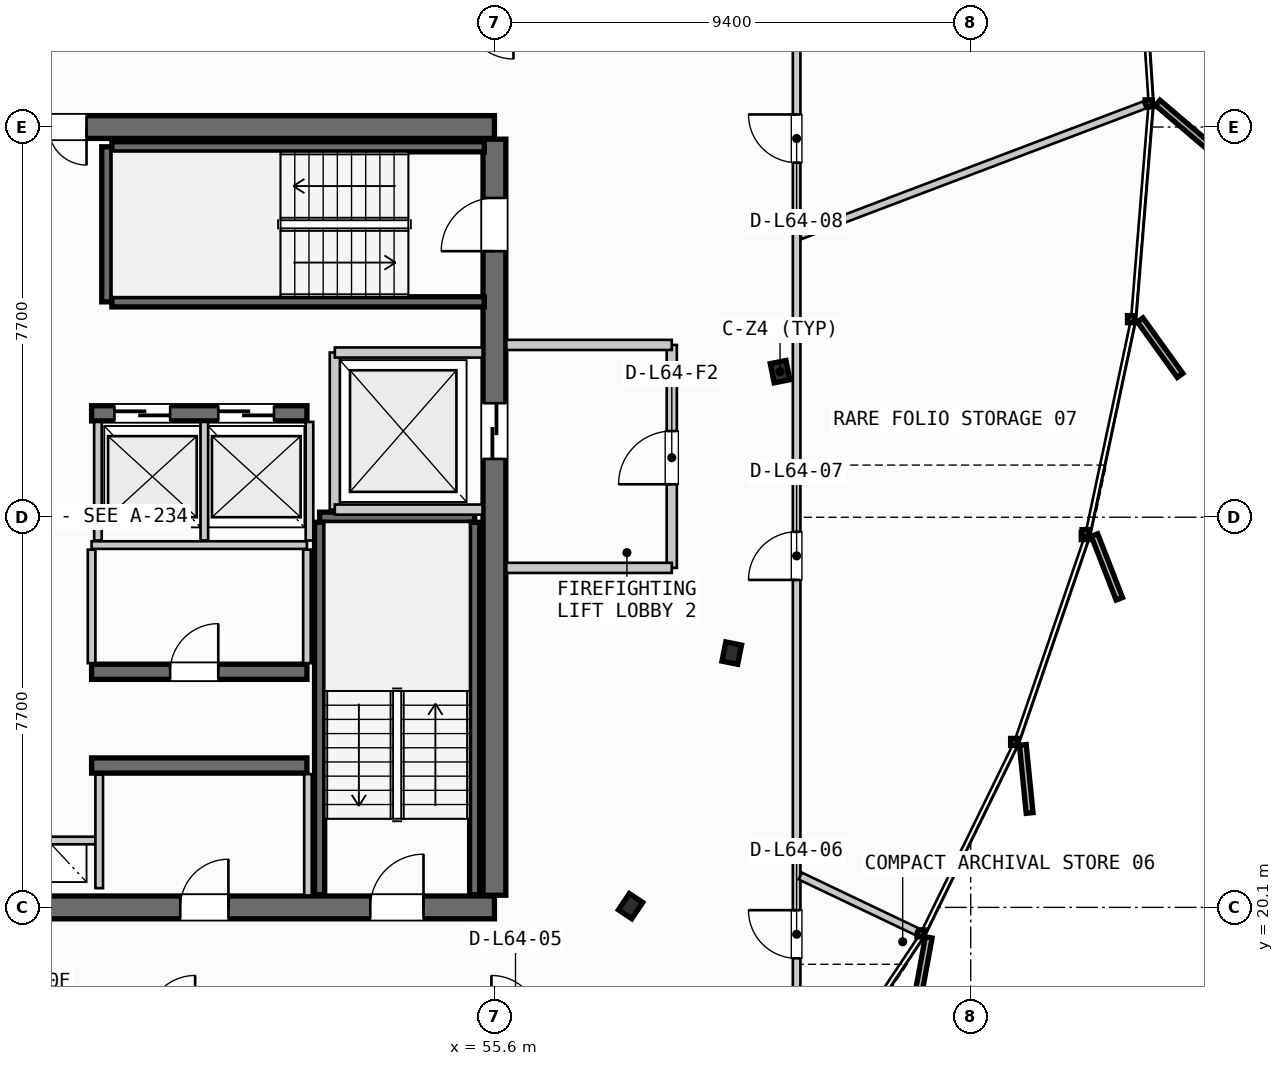
"""IFC4 building model, lengths in metres.
Left out: names, types, materials, properties, quantities, classifications, styles, units other than length and angle.
Written with IfcOpenShell. Run it as: python <this file> out.ifc"""

import sys

from ifc_helpers import new_model, si_unit, direction, frame, frame_2d, origin, origin_2d, place, context, subcontext, project, spatial, rectangle, i_section, extrude, source, transform, mapped, element, fill, save


model = new_model("IFC4")
c1 = context("Model", 3, precision=1e-05, world=origin(), true_north=direction((0.0, 1.0)))
c2 = subcontext(c1, "Body", "Model", "MODEL_VIEW")
j1 = project(units=[si_unit("LENGTHUNIT", "METRE"), si_unit("PLANEANGLEUNIT", "RADIAN")], contexts=[c1])
p1 = place(None, origin())
s1 = spatial("IfcSite", under=j1, at=p1, CompositionType="ELEMENT")
p2 = place(p1, origin())
s2 = spatial("IfcBuilding", under=s1, at=p2, CompositionType="ELEMENT")
p3 = place(p2, frame((0.0, 0.0, 245.65)))
s3 = spatial("IfcBuildingStorey", under=s2, at=p3, CompositionType="ELEMENT", Elevation=245.65)
p4 = place(p3, frame((38.0, 20.1, 0.0), z_axis=(0.0, 0.0, 1.0), x_axis=(1.0, 0.0, 0.0)))
e1 = element("IfcWall", 1, at=p4, inside=s3, PredefinedType="SHEAR", context=c2, shape_type="SweptSolid", body=[
    extrude(rectangle(XDim=17.6, YDim=0.45, at=frame_2d((8.8, 0.0))), origin(), (0.0, 0.0, 1.0), 3.21),
])
p5 = place(p4, frame((1.4, 0.0, 0.0)))
e2 = element("IfcOpeningElement", 2, at=p5, cuts=e1, PredefinedType="OPENING", context=c2, shape_type="SweptSolid", body=[
    extrude(rectangle(XDim=1.05, YDim=2.15, at=frame_2d((0.525, 1.075))), frame((0.0, 0.235, 0.0), z_axis=(0.0, -1.0, 0.0), x_axis=(1.0, 0.0, 0.0)), (0.0, 0.0, 1.0), 0.47),
])
p6 = place(p4, frame((15.15, 0.0, 0.0)))
e3 = element("IfcOpeningElement", 3, at=p6, cuts=e1, PredefinedType="OPENING", context=c2, shape_type="SweptSolid", body=[
    extrude(rectangle(XDim=1.05, YDim=2.15, at=frame_2d((0.525, 1.075))), frame((0.0, 0.235, 0.0), z_axis=(0.0, -1.0, 0.0), x_axis=(1.0, 0.0, 0.0)), (0.0, 0.0, 1.0), 0.47),
])
p7 = place(p4, frame((5.25, 0.0, 0.0)))
e4 = element("IfcOpeningElement", 4, at=p7, cuts=e1, PredefinedType="OPENING", context=c2, shape_type="SweptSolid", body=[
    extrude(rectangle(XDim=0.95, YDim=2.15, at=frame_2d((0.475, 1.075))), frame((0.0, 0.235, 0.0), z_axis=(0.0, -1.0, 0.0), x_axis=(1.0, 0.0, 0.0)), (0.0, 0.0, 1.0), 0.47),
])
p8 = place(p4, frame((11.4, 0.0, 0.0)))
e5 = element("IfcOpeningElement", 5, at=p8, cuts=e1, PredefinedType="OPENING", context=c2, shape_type="SweptSolid", body=[
    extrude(rectangle(XDim=0.95, YDim=2.15, at=frame_2d((0.475, 1.075))), frame((0.0, 0.235, 0.0), z_axis=(0.0, -1.0, 0.0), x_axis=(1.0, 0.0, 0.0)), (0.0, 0.0, 1.0), 0.47),
])
p9 = place(p3, frame((55.6, 35.5, 0.0), z_axis=(0.0, 0.0, 1.0), x_axis=(-1.0, 0.0, 0.0)))
e6 = element("IfcWall", 6, at=p9, inside=s3, PredefinedType="SHEAR", context=c2, shape_type="SweptSolid", body=[
    extrude(rectangle(XDim=17.6, YDim=0.45, at=frame_2d((8.8, 0.0))), origin(), (0.0, 0.0, 1.0), 3.21),
])
p10 = place(p9, frame((8.05, 0.0, 0.0)))
e7 = element("IfcOpeningElement", 7, at=p10, cuts=e6, PredefinedType="OPENING", context=c2, shape_type="SweptSolid", body=[
    extrude(rectangle(XDim=1.5, YDim=2.2, at=frame_2d((0.75, 1.1))), frame((0.0, 0.235, 0.0), z_axis=(0.0, -1.0, 0.0), x_axis=(1.0, 0.0, 0.0)), (0.0, 0.0, 1.0), 0.47),
])
p11 = place(p9, frame((15.1, 0.0, 0.0)))
e8 = element("IfcOpeningElement", 8, at=p11, cuts=e6, PredefinedType="OPENING", context=c2, shape_type="SweptSolid", body=[
    extrude(rectangle(XDim=0.95, YDim=2.15, at=frame_2d((0.475, 1.075))), frame((0.0, 0.235, 0.0), z_axis=(0.0, -1.0, 0.0), x_axis=(1.0, 0.0, 0.0)), (0.0, 0.0, 1.0), 0.47),
])
p12 = place(p9, frame((12.6, 0.0, 0.0)))
e9 = element("IfcOpeningElement", 9, at=p12, cuts=e6, PredefinedType="OPENING", context=c2, shape_type="SweptSolid", body=[
    extrude(rectangle(XDim=0.95, YDim=2.15, at=frame_2d((0.475, 1.075))), frame((0.0, 0.235, 0.0), z_axis=(0.0, -1.0, 0.0), x_axis=(1.0, 0.0, 0.0)), (0.0, 0.0, 1.0), 0.47),
])
p13 = place(p9, frame((10.45, 0.0, 0.0)))
e10 = element("IfcOpeningElement", 10, at=p13, cuts=e6, PredefinedType="OPENING", context=c2, shape_type="SweptSolid", body=[
    extrude(rectangle(XDim=0.95, YDim=2.15, at=frame_2d((0.475, 1.075))), frame((0.0, 0.235, 0.0), z_axis=(0.0, -1.0, 0.0), x_axis=(1.0, 0.0, 0.0)), (0.0, 0.0, 1.0), 0.47),
])
p14 = place(p3, frame((55.6, 20.34, 0.0), z_axis=(0.0, 0.0, 1.0), x_axis=(0.0, 1.0, 0.0)))
e11 = element("IfcWall", 11, at=p14, inside=s3, PredefinedType="SHEAR", context=c2, shape_type="SweptSolid", body=[
    extrude(rectangle(XDim=14.92, YDim=0.45, at=frame_2d((7.46, 0.0))), origin(), (0.0, 0.0, 1.0), 3.21),
])
p15 = place(p14, frame((12.71, 0.0, 0.0)))
e12 = element("IfcOpeningElement", 12, at=p15, cuts=e11, PredefinedType="OPENING", context=c2, shape_type="SweptSolid", body=[
    extrude(rectangle(XDim=1.05, YDim=2.15, at=frame_2d((0.525, 1.075))), frame((0.0, 0.235, 0.0), z_axis=(0.0, -1.0, 0.0), x_axis=(1.0, 0.0, 0.0)), (0.0, 0.0, 1.0), 0.47),
])
p16 = place(p14, frame((8.61, 0.0, 0.0)))
e13 = element("IfcOpeningElement", 13, at=p16, cuts=e11, PredefinedType="OPENING", context=c2, shape_type="SweptSolid", body=[
    extrude(rectangle(XDim=1.1, YDim=2.2, at=frame_2d((0.55, 1.1))), frame((0.0, 0.235, 0.0), z_axis=(0.0, -1.0, 0.0), x_axis=(1.0, 0.0, 0.0)), (0.0, 0.0, 1.0), 0.47),
])
p17 = place(p3, frame((47.65, 22.9, 0.0), z_axis=(0.0, 0.0, 1.0), x_axis=(1.0, 0.0, 0.0)))
e14 = element("IfcWall", 14, at=p17, inside=s3, PredefinedType="SHEAR", context=c2, shape_type="SweptSolid", body=[
    extrude(rectangle(XDim=4.25, YDim=0.3, at=frame_2d((2.125, 0.0))), origin(), (0.0, 0.0, 1.0), 3.21),
])
p18 = place(p3, frame((47.65, 24.75, 0.0), z_axis=(0.0, 0.0, 1.0), x_axis=(1.0, 0.0, 0.0)))
e15 = element("IfcWall", 15, at=p18, inside=s3, PredefinedType="SHEAR", context=c2, shape_type="SweptSolid", body=[
    extrude(rectangle(XDim=4.25, YDim=0.3, at=frame_2d((2.125, 0.0))), origin(), (0.0, 0.0, 1.0), 3.21),
])
p19 = place(p18, frame((1.55, 0.0, 0.0)))
e16 = element("IfcOpeningElement", 16, at=p19, cuts=e15, PredefinedType="OPENING", context=c2, shape_type="SweptSolid", body=[
    extrude(rectangle(XDim=0.95, YDim=2.15, at=frame_2d((0.475, 1.075))), frame((0.0, 0.16, 0.0), z_axis=(0.0, -1.0, 0.0), x_axis=(1.0, 0.0, 0.0)), (0.0, 0.0, 1.0), 0.32),
])
p20 = place(p3, frame((47.65, 29.85, 0.0), z_axis=(0.0, 0.0, 1.0), x_axis=(1.0, 0.0, 0.0)))
e17 = element("IfcWall", 17, at=p20, inside=s3, PredefinedType="SHEAR", context=c2, shape_type="SweptSolid", body=[
    extrude(rectangle(XDim=4.25, YDim=0.3, at=frame_2d((2.125, 0.0))), origin(), (0.0, 0.0, 1.0), 3.21),
])
p21 = place(p20, frame((0.45, 0.0, 0.0)))
e18 = element("IfcOpeningElement", 18, at=p21, cuts=e17, PredefinedType="OPENING", context=c2, shape_type="SweptSolid", body=[
    extrude(rectangle(XDim=1.1, YDim=2.2, at=frame_2d((0.55, 1.1))), frame((0.0, 0.16, 0.0), z_axis=(0.0, -1.0, 0.0), x_axis=(1.0, 0.0, 0.0)), (0.0, 0.0, 1.0), 0.32),
])
p22 = place(p20, frame((2.5, 0.0, 0.0)))
e19 = element("IfcOpeningElement", 19, at=p22, cuts=e17, PredefinedType="OPENING", context=c2, shape_type="SweptSolid", body=[
    extrude(rectangle(XDim=1.1, YDim=2.2, at=frame_2d((0.55, 1.1))), frame((0.0, 0.16, 0.0), z_axis=(0.0, -1.0, 0.0), x_axis=(1.0, 0.0, 0.0)), (0.0, 0.0, 1.0), 0.32),
])
m1 = source(origin(), c2, "Body", "SweptSolid", [
    extrude(i_section(OverallWidth=0.387, OverallDepth=0.316, WebThickness=0.019, FlangeThickness=0.028, FilletRadius=0.015, at=origin_2d()), origin(), (0.0, 0.0, 1.0), 3.21),
])
for number, where, z_axis, x_axis in (
    (20, (61.237, 30.672, 0.0), (0.0, 0.0, 1.0), (0.981, 0.195, 0.0)),
    (21, (58.287, 20.125, 0.0), (0.0, 0.0, 1.0), (0.831, -0.556, 0.0)),
    (22, (60.284, 25.118, 0.0), (0.0, 0.0, 1.0), (0.981, -0.195, 0.0)),
):
    element("IfcColumn", number, at=place(p3, frame(where, z_axis=z_axis, x_axis=x_axis)), inside=s3, PredefinedType="COLUMN", context=c2, shape_type="MappedRepresentation", body=[
        mapped(m1, transform((0.0, 0.0, 0.0), scale=1.0)),
    ])
p23 = place(p3, frame((52.15, 27.8, 0.0), z_axis=(0.0, 0.0, 1.0), x_axis=(1.0, 0.0, 0.0)))
e23 = element("IfcWall", 23, at=p23, inside=s3, PredefinedType="SHEAR", context=c2, shape_type="SweptSolid", body=[
    extrude(rectangle(XDim=3.06, YDim=0.2, at=frame_2d((1.53, 0.0))), origin(), (0.0, 0.0, 1.0), 3.21),
])
for number, where, z_axis, x_axis in (
    (24, (55.21, 27.7, 0.0), (0.0, 0.0, 1.0), (0.0, -1.0, 0.0)),
    (25, (52.15, 20.35, 0.0), (0.0, 0.0, 1.0), (0.0, 1.0, 0.0)),
):
    element("IfcWall", number, at=place(p3, frame(where, z_axis=z_axis, x_axis=x_axis)), inside=s3, PredefinedType="SHEAR", context=c2, shape_type="SweptSolid", body=[
        extrude(rectangle(XDim=7.35, YDim=0.2, at=frame_2d((3.675, 0.0))), origin(), (0.0, 0.0, 1.0), 3.21),
    ])
p24 = place(p3, frame((47.95, 32.05, 0.0), z_axis=(0.0, 0.0, 1.0), x_axis=(0.0, 1.0, 0.0)))
e26 = element("IfcWall", 26, at=p24, inside=s3, PredefinedType="SHEAR", context=c2, shape_type="SweptSolid", body=[
    extrude(rectangle(XDim=3.06, YDim=0.2, at=frame_2d((1.53, 0.0))), origin(), (0.0, 0.0, 1.0), 3.21),
])
for number, where, z_axis, x_axis in (
    (27, (48.05, 35.11, 0.0), (0.0, 0.0, 1.0), (1.0, 0.0, 0.0)),
    (28, (55.4, 32.05, 0.0), (0.0, 0.0, 1.0), (-1.0, 0.0, 0.0)),
):
    element("IfcWall", number, at=place(p3, frame(where, z_axis=z_axis, x_axis=x_axis)), inside=s3, PredefinedType="SHEAR", context=c2, shape_type="SweptSolid", body=[
        extrude(rectangle(XDim=7.35, YDim=0.2, at=frame_2d((3.675, 0.0))), origin(), (0.0, 0.0, 1.0), 3.21),
    ])
p25 = place(p3, frame((45.8, 21.42, 0.0), z_axis=(0.0, 0.0, 1.0), x_axis=(1.0, 0.0, 0.0)))
e29 = element("IfcWall", 29, at=p25, inside=s3, PredefinedType="PARTITIONING", context=c2, shape_type="SweptSolid", body=[
    extrude(rectangle(XDim=2.0, YDim=0.15, at=frame_2d((1.0, 0.0))), origin(), (0.0, 0.0, 1.0), 2.28),
])
p26 = place(p3, frame((47.8, 20.48, 0.0), z_axis=(0.0, 0.0, 1.0), x_axis=(0.0, 1.0, 0.0)))
e30 = element("IfcWall", 30, at=p26, inside=s3, PredefinedType="PARTITIONING", context=c2, shape_type="SweptSolid", body=[
    extrude(rectangle(XDim=2.24, YDim=0.15, at=frame_2d((1.12, 0.0))), origin(), (0.0, 0.0, 1.0), 2.28),
])
p27 = place(p3, frame((52.45, 27.95, 0.0), z_axis=(0.0, 0.0, 1.0), x_axis=(0.0, 1.0, 0.0)))
e31 = element("IfcWall", 31, at=p27, inside=s3, PredefinedType="PARTITIONING", context=c2, shape_type="SweptSolid", body=[
    extrude(rectangle(XDim=3.1, YDim=0.2, at=frame_2d((1.55, 0.0))), origin(), (0.0, 0.0, 1.0), 2.28),
])
for number, where, z_axis, x_axis in (
    (32, (52.45, 27.95, 0.0), (0.0, 0.0, 1.0), (1.0, 0.0, 0.0)),
    (33, (52.45, 31.05, 0.0), (0.0, 0.0, 1.0), (1.0, 0.0, 0.0)),
):
    element("IfcWall", number, at=place(p3, frame(where, z_axis=z_axis, x_axis=x_axis)), inside=s3, PredefinedType="PARTITIONING", context=c2, shape_type="SweptSolid", body=[
        extrude(rectangle(XDim=2.915, YDim=0.2, at=frame_2d((1.458, 0.0))), origin(), (0.0, 0.0, 1.0), 2.28),
    ])
p28 = place(p3, frame((59.1, 26.8, 0.0), z_axis=(0.0, 0.0, 1.0), x_axis=(0.0, 1.0, 0.0)))
e34 = element("IfcWall", 34, at=p28, inside=s3, PredefinedType="PARTITIONING", context=c2, shape_type="SweptSolid", body=[
    extrude(rectangle(XDim=4.4, YDim=0.2, at=frame_2d((2.2, 0.0))), origin(), (0.0, 0.0, 1.0), 2.28),
])
p29 = place(p28, frame((1.65, 0.0, 0.0)))
e35 = element("IfcOpeningElement", 35, at=p29, cuts=e34, PredefinedType="OPENING", context=c2, shape_type="SweptSolid", body=[
    extrude(rectangle(XDim=1.05, YDim=2.15, at=frame_2d((0.525, 1.075))), frame((0.0, 0.11, 0.0), z_axis=(0.0, -1.0, 0.0), x_axis=(1.0, 0.0, 0.0)), (0.0, 0.0, 1.0), 0.22),
])
for number, where, z_axis, x_axis in (
    (36, (55.835, 26.8, 0.0), (0.0, 0.0, 1.0), (1.0, 0.0, 0.0)),
    (37, (55.835, 31.2, 0.0), (0.0, 0.0, 1.0), (1.0, 0.0, 0.0)),
):
    element("IfcWall", number, at=place(p3, frame(where, z_axis=z_axis, x_axis=x_axis)), inside=s3, PredefinedType="PARTITIONING", context=c2, shape_type="SweptSolid", body=[
        extrude(rectangle(XDim=3.265, YDim=0.2, at=frame_2d((1.633, 0.0))), origin(), (0.0, 0.0, 1.0), 2.28),
    ])
p30 = place(p3, frame((51.92, 20.335, 0.0), z_axis=(0.0, 0.0, 1.0), x_axis=(0.0, 1.0, 0.0)))
e38 = element("IfcWall", 38, at=p30, inside=s3, PredefinedType="PARTITIONING", context=c2, shape_type="SweptSolid", body=[
    extrude(rectangle(XDim=2.395, YDim=0.15, at=frame_2d((1.198, 0.0))), origin(), (0.0, 0.0, 1.0), 2.28),
])
p31 = place(p3, frame((47.65, 27.25, 0.0), z_axis=(0.0, 0.0, 1.0), x_axis=(1.0, 0.0, 0.0)))
e39 = element("IfcWall", 39, at=p31, inside=s3, PredefinedType="PARTITIONING", context=c2, shape_type="SweptSolid", body=[
    extrude(rectangle(XDim=4.25, YDim=0.15, at=frame_2d((2.125, 0.0))), origin(), (0.0, 0.0, 1.0), 2.28),
])
for number, where, z_axis, x_axis in (
    (40, (47.65, 24.92, 0.0), (0.0, 0.0, 1.0), (0.0, 1.0, 0.0)),
    (41, (51.9, 24.92, 0.0), (0.0, 0.0, 1.0), (0.0, 1.0, 0.0)),
):
    element("IfcWall", number, at=place(p3, frame(where, z_axis=z_axis, x_axis=x_axis)), inside=s3, PredefinedType="PARTITIONING", context=c2, shape_type="SweptSolid", body=[
        extrude(rectangle(XDim=2.24, YDim=0.15, at=frame_2d((1.12, 0.0))), origin(), (0.0, 0.0, 1.0), 2.28),
    ])
for number, where, z_axis, x_axis in (
    (42, (47.775, 27.34, 0.0), (0.0, 0.0, 1.0), (0.0, 1.0, 0.0)),
    (43, (49.875, 27.34, 0.0), (0.0, 0.0, 1.0), (0.0, 1.0, 0.0)),
    (44, (51.95, 27.34, 0.0), (0.0, 0.0, 1.0), (0.0, 1.0, 0.0)),
):
    element("IfcWall", number, at=place(p3, frame(where, z_axis=z_axis, x_axis=x_axis)), inside=s3, PredefinedType="PARTITIONING", context=c2, shape_type="SweptSolid", body=[
        extrude(rectangle(XDim=2.34, YDim=0.15, at=frame_2d((1.17, 0.0))), origin(), (0.0, 0.0, 1.0), 2.28),
    ])
p32 = place(p3, frame((61.564, 17.807, 0.0), z_axis=(0.0, 0.0, 1.0), x_axis=(0.0, 1.0, 0.0)))
e45 = element("IfcWall", 45, at=p32, inside=s3, PredefinedType="PARTITIONING", context=c2, shape_type="SweptSolid", body=[
    extrude(rectangle(XDim=19.986, YDim=0.15, at=frame_2d((9.993, 0.0))), origin(), (0.0, 0.0, 1.0), 2.28),
])
p33 = place(p32, frame((1.288, 0.0, 0.0)))
e46 = element("IfcOpeningElement", 46, at=p33, cuts=e45, PredefinedType="OPENING", context=c2, shape_type="SweptSolid", body=[
    extrude(rectangle(XDim=0.95, YDim=2.15, at=frame_2d((0.475, 1.075))), frame((0.0, 0.085, 0.0), z_axis=(0.0, -1.0, 0.0), x_axis=(1.0, 0.0, 0.0)), (0.0, 0.0, 1.0), 0.17),
])
p34 = place(p32, frame((8.755, 0.0, 0.0)))
e47 = element("IfcOpeningElement", 47, at=p34, cuts=e45, PredefinedType="OPENING", context=c2, shape_type="SweptSolid", body=[
    extrude(rectangle(XDim=0.95, YDim=2.15, at=frame_2d((0.475, 1.075))), frame((0.0, 0.085, 0.0), z_axis=(0.0, -1.0, 0.0), x_axis=(1.0, 0.0, 0.0)), (0.0, 0.0, 1.0), 0.17),
])
p35 = place(p32, frame((16.991, 0.0, 0.0)))
e48 = element("IfcOpeningElement", 48, at=p35, cuts=e45, PredefinedType="OPENING", context=c2, shape_type="SweptSolid", body=[
    extrude(rectangle(XDim=0.95, YDim=2.15, at=frame_2d((0.475, 1.075))), frame((0.0, 0.085, 0.0), z_axis=(0.0, -1.0, 0.0), x_axis=(1.0, 0.0, 0.0)), (0.0, 0.0, 1.0), 0.17),
])
p36 = place(p3, frame((61.636, 20.719, 0.0), z_axis=(0.0, 0.0, 1.0), x_axis=(0.902636442074, -0.430403826006, 0.0)))
e49 = element("IfcWall", 49, at=p36, inside=s3, PredefinedType="PARTITIONING", context=c2, shape_type="SweptSolid", body=[
    extrude(rectangle(XDim=2.539, YDim=0.15, at=frame_2d((1.27, 0.0))), origin(), (0.0, 0.0, 1.0), 2.28),
])
p37 = place(p3, frame((61.639, 33.361, 0.0), z_axis=(0.0, 0.0, 1.0), x_axis=(0.935050196541, 0.354515345152, 0.0)))
e50 = element("IfcWall", 50, at=p37, inside=s3, PredefinedType="PARTITIONING", context=c2, shape_type="SweptSolid", body=[
    extrude(rectangle(XDim=7.26, YDim=0.15, at=frame_2d((3.63, 0.0))), origin(), (0.0, 0.0, 1.0), 2.28),
])
m2 = source(origin(), c2, "Body", "SweptSolid", [
    extrude(rectangle(XDim=1.05, YDim=2.15, at=frame_2d((0.525, 1.075))), frame((0.0, 0.025, 0.0), z_axis=(0.0, -1.0, 0.0), x_axis=(1.0, 0.0, 0.0)), (0.0, 0.0, 1.0), 0.05),
])
p38 = place(p6, origin())
e51 = element("IfcDoor", 51, at=p38, inside=s3, OperationType="SINGLE_SWING_RIGHT", PredefinedType="DOOR", context=c2, shape_type="MappedRepresentation", body=[
    mapped(m2, transform((0.0, 0.0, 0.0), scale=1.0)),
])
fill(e3, e51)
p39 = place(p15, origin())
e52 = element("IfcDoor", 52, at=p39, inside=s3, OperationType="SINGLE_SWING_LEFT", PredefinedType="DOOR", context=c2, shape_type="MappedRepresentation", body=[
    mapped(m2, transform((0.0, 0.0, 0.0), scale=1.0)),
])
fill(e12, e52)
m3 = source(origin(), c2, "Body", "SweptSolid", [
    extrude(rectangle(XDim=1.5, YDim=2.2, at=frame_2d((0.75, 1.1))), frame((0.0, 0.025, 0.0), z_axis=(0.0, -1.0, 0.0), x_axis=(1.0, 0.0, 0.0)), (0.0, 0.0, 1.0), 0.05),
])
p40 = place(p10, origin())
e53 = element("IfcDoor", 53, at=p40, inside=s3, OperationType="DOUBLE_DOOR_SINGLE_SWING", PredefinedType="DOOR", context=c2, shape_type="MappedRepresentation", body=[
    mapped(m3, transform((0.0, 0.0, 0.0), scale=1.0)),
])
fill(e7, e53)
m4 = source(origin(), c2, "Body", "SweptSolid", [
    extrude(rectangle(XDim=1.1, YDim=2.2, at=frame_2d((0.55, 1.1))), frame((0.0, 0.025, 0.0), z_axis=(0.0, -1.0, 0.0), x_axis=(1.0, 0.0, 0.0)), (0.0, 0.0, 1.0), 0.05),
])
p41 = place(p16, origin())
e54 = element("IfcDoor", 54, at=p41, inside=s3, OperationType="SLIDING_TO_RIGHT", PredefinedType="DOOR", context=c2, shape_type="MappedRepresentation", body=[
    mapped(m4, transform((0.0, 0.0, 0.0), scale=1.0)),
])
fill(e13, e54)
m5 = source(origin(), c2, "Body", "SweptSolid", [
    extrude(rectangle(XDim=0.95, YDim=2.15, at=frame_2d((0.475, 1.075))), frame((0.0, 0.025, 0.0), z_axis=(0.0, -1.0, 0.0), x_axis=(1.0, 0.0, 0.0)), (0.0, 0.0, 1.0), 0.05),
])
p42 = place(p8, origin())
e55 = element("IfcDoor", 55, at=p42, inside=s3, OperationType="SINGLE_SWING_RIGHT", PredefinedType="DOOR", context=c2, shape_type="MappedRepresentation", body=[
    mapped(m5, transform((0.0, 0.0, 0.0), scale=1.0)),
])
fill(e5, e55)
p43 = place(p19, origin())
e56 = element("IfcDoor", 56, at=p43, inside=s3, OperationType="SINGLE_SWING_RIGHT", PredefinedType="DOOR", context=c2, shape_type="MappedRepresentation", body=[
    mapped(m5, transform((0.0, 0.0, 0.0), scale=1.0)),
])
fill(e16, e56)
p44 = place(p21, origin())
e57 = element("IfcDoor", 57, at=p44, inside=s3, OperationType="SLIDING_TO_LEFT", PredefinedType="DOOR", context=c2, shape_type="MappedRepresentation", body=[
    mapped(m4, transform((0.0, 0.0, 0.0), scale=1.0)),
])
fill(e18, e57)
p45 = place(p22, origin())
e58 = element("IfcDoor", 58, at=p45, inside=s3, OperationType="SLIDING_TO_LEFT", PredefinedType="DOOR", context=c2, shape_type="MappedRepresentation", body=[
    mapped(m4, transform((0.0, 0.0, 0.0), scale=1.0)),
])
fill(e19, e58)
p46 = place(p29, origin())
e59 = element("IfcDoor", 59, at=p46, inside=s3, OperationType="SINGLE_SWING_LEFT", PredefinedType="DOOR", context=c2, shape_type="MappedRepresentation", body=[
    mapped(m2, transform((0.0, 0.0, 0.0), scale=1.0)),
])
fill(e35, e59)
p47 = place(p33, origin())
e60 = element("IfcDoor", 60, at=p47, inside=s3, OperationType="SINGLE_SWING_RIGHT", PredefinedType="DOOR", context=c2, shape_type="MappedRepresentation", body=[
    mapped(m5, transform((0.0, 0.0, 0.0), scale=1.0)),
])
fill(e46, e60)
p48 = place(p34, origin())
e61 = element("IfcDoor", 61, at=p48, inside=s3, OperationType="SINGLE_SWING_LEFT", PredefinedType="DOOR", context=c2, shape_type="MappedRepresentation", body=[
    mapped(m5, transform((0.0, 0.0, 0.0), scale=1.0)),
])
fill(e47, e61)
p49 = place(p35, origin())
e62 = element("IfcDoor", 62, at=p49, inside=s3, OperationType="SINGLE_SWING_RIGHT", PredefinedType="DOOR", context=c2, shape_type="MappedRepresentation", body=[
    mapped(m5, transform((0.0, 0.0, 0.0), scale=1.0)),
])
fill(e48, e62)
save(model, sys.argv[1])
